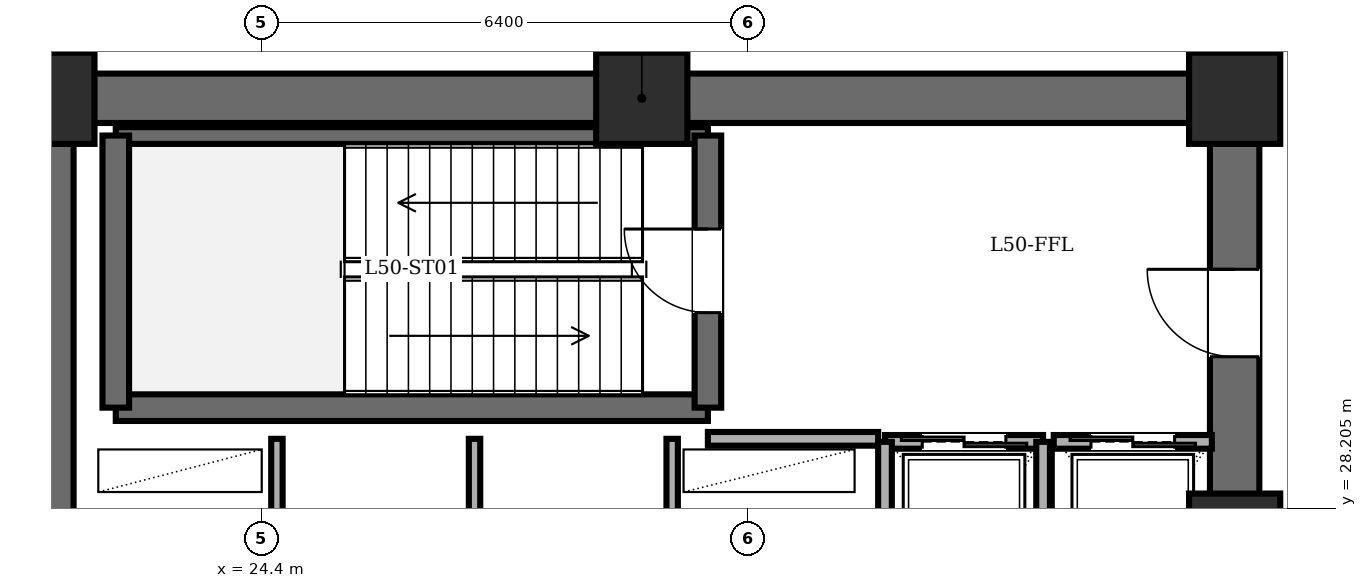
"""IFC4 building model, lengths in metres.
Left out: names, types, materials, properties, quantities, classifications, styles, units other than length and angle.
Written with IfcOpenShell. Run it as: python <this file> out.ifc"""

import sys

from ifc_helpers import new_model, si_unit, direction, frame, frame_2d, origin, origin_2d, place, context, subcontext, project, spatial, rectangle, extrude, element, fill, save


model = new_model("IFC4")
c1 = context("Model", 3, precision=1e-05, world=origin(), true_north=direction((0.0, 1.0)))
c2 = subcontext(c1, "Body", "Model", "MODEL_VIEW")
j1 = project(units=[si_unit("LENGTHUNIT", "METRE"), si_unit("PLANEANGLEUNIT", "RADIAN")], contexts=[c1])
p1 = place(None, origin())
s1 = spatial("IfcSite", under=j1, at=p1, CompositionType="ELEMENT")
p2 = place(p1, origin())
s2 = spatial("IfcBuilding", under=s1, at=p2, CompositionType="ELEMENT")
p3 = place(p2, frame((0.0, 0.0, 190.6)))
s3 = spatial("IfcBuildingStorey", under=s2, at=p3, CompositionType="ELEMENT", Elevation=190.6)
for number, where, z_axis, x_axis in (
    (1, (37.2, 27.8, 0.0), (0.0, 0.0, 1.0), (1.0, 0.0, 0.0)),
    (2, (37.2, 33.6, 0.0), (0.0, 0.0, 1.0), (1.0, 0.0, 0.0)),
    (3, (29.4, 33.6, 0.0), (0.0, 0.0, 1.0), (1.0, 0.0, 0.0)),
    (4, (21.6, 33.6, 0.0), (0.0, 0.0, 1.0), (1.0, 0.0, 0.0)),
):
    element("IfcColumn", number, at=place(p3, frame(where, z_axis=z_axis, x_axis=x_axis)), inside=s3, PredefinedType="COLUMN", context=c2, shape_type="SweptSolid", body=[
        extrude(rectangle(XDim=1.2, YDim=1.2, at=origin_2d()), origin(), (0.0, 0.0, 1.0), 5.6),
    ])
p4 = place(p3, frame((21.6, 14.4, 0.0), z_axis=(0.0, 0.0, 1.0), x_axis=(0.0, 1.0, 0.0)))
e5 = element("IfcWall", 5, at=p4, inside=s3, PredefinedType="SHEAR", context=c2, shape_type="SweptSolid", body=[
    extrude(rectangle(XDim=19.2, YDim=0.65, at=frame_2d((9.6, 0.0))), origin(), (0.0, 0.0, 1.0), 5.36),
])
p5 = place(p3, frame((21.6, 33.6, 0.0), z_axis=(0.0, 0.0, 1.0), x_axis=(1.0, 0.0, 0.0)))
e6 = element("IfcWall", 6, at=p5, inside=s3, PredefinedType="SHEAR", context=c2, shape_type="SweptSolid", body=[
    extrude(rectangle(XDim=15.6, YDim=0.65, at=frame_2d((7.8, 0.0))), origin(), (0.0, 0.0, 1.0), 5.36),
])
p6 = place(p3, frame((37.2, 14.4, 0.0), z_axis=(0.0, 0.0, 1.0), x_axis=(0.0, 1.0, 0.0)))
e7 = element("IfcWall", 7, at=p6, inside=s3, PredefinedType="SHEAR", context=c2, shape_type="SweptSolid", body=[
    extrude(rectangle(XDim=19.2, YDim=0.65, at=frame_2d((9.6, 0.0))), origin(), (0.0, 0.0, 1.0), 5.36),
])
p7 = place(p6, frame((15.8, 0.0, 0.0)))
e8 = element("IfcOpeningElement", 8, at=p7, cuts=e7, PredefinedType="OPENING", context=c2, shape_type="SweptSolid", body=[
    extrude(rectangle(XDim=1.15, YDim=2.15, at=frame_2d((0.575, 1.075))), frame((0.0, 0.335, 0.0), z_axis=(0.0, -1.0, 0.0), x_axis=(1.0, 0.0, 0.0)), (0.0, 0.0, 1.0), 0.67),
])
p8 = place(p6, frame((3.6, 0.0, 0.0)))
e9 = element("IfcOpeningElement", 9, at=p8, cuts=e7, PredefinedType="OPENING", context=c2, shape_type="SweptSolid", body=[
    extrude(rectangle(XDim=1.1, YDim=2.15, at=frame_2d((0.55, 1.075))), frame((0.0, 0.335, 0.0), z_axis=(0.0, -1.0, 0.0), x_axis=(1.0, 0.0, 0.0)), (0.0, 0.0, 1.0), 0.67),
])
p9 = place(p6, frame((8.6, 0.0, 0.0)))
e10 = element("IfcOpeningElement", 10, at=p9, cuts=e7, PredefinedType="OPENING", context=c2, shape_type="SweptSolid", body=[
    extrude(rectangle(XDim=1.3, YDim=2.2, at=frame_2d((0.65, 1.1))), frame((0.0, 0.335, 0.0), z_axis=(0.0, -1.0, 0.0), x_axis=(1.0, 0.0, 0.0)), (0.0, 0.0, 1.0), 0.67),
])
p10 = place(p3, frame((22.48, 29.53, 0.0), z_axis=(0.0, 0.0, 1.0), x_axis=(1.0, 0.0, 0.0)))
e11 = element("IfcWall", 11, at=p10, inside=s3, PredefinedType="SOLIDWALL", context=c2, shape_type="SweptSolid", body=[
    extrude(rectangle(XDim=7.79, YDim=0.35, at=frame_2d((3.895, 0.0))), origin(), (0.0, 0.0, 1.0), 5.36),
])
p11 = place(p3, frame((22.48, 33.11, 0.0), z_axis=(0.0, 0.0, 1.0), x_axis=(1.0, 0.0, 0.0)))
e12 = element("IfcWall", 12, at=p11, inside=s3, PredefinedType="PARTITIONING", context=c2, shape_type="SweptSolid", body=[
    extrude(rectangle(XDim=7.79, YDim=0.22, at=frame_2d((3.895, 0.0))), origin(), (0.0, 0.0, 1.0), 5.36),
])
p12 = place(p3, frame((22.48, 29.53, 0.0), z_axis=(0.0, 0.0, 1.0), x_axis=(0.0, 1.0, 0.0)))
e13 = element("IfcWall", 13, at=p12, inside=s3, PredefinedType="SOLIDWALL", context=c2, shape_type="SweptSolid", body=[
    extrude(rectangle(XDim=3.58, YDim=0.35, at=frame_2d((1.79, 0.0))), origin(), (0.0, 0.0, 1.0), 5.36),
])
p13 = place(p3, frame((30.27, 29.53, 0.0), z_axis=(0.0, 0.0, 1.0), x_axis=(0.0, 1.0, 0.0)))
e14 = element("IfcWall", 14, at=p13, inside=s3, PredefinedType="SOLIDWALL", context=c2, shape_type="SweptSolid", body=[
    extrude(rectangle(XDim=3.58, YDim=0.35, at=frame_2d((1.79, 0.0))), origin(), (0.0, 0.0, 1.0), 5.36),
])
p14 = place(p13, frame((1.25, 0.0, 0.0)))
e15 = element("IfcOpeningElement", 15, at=p14, cuts=e14, PredefinedType="OPENING", context=c2, shape_type="SweptSolid", body=[
    extrude(rectangle(XDim=1.1, YDim=2.15, at=frame_2d((0.55, 1.075))), frame((0.0, 0.185, 0.0), z_axis=(0.0, -1.0, 0.0), x_axis=(1.0, 0.0, 0.0)), (0.0, 0.0, 1.0), 0.37),
])
p15 = place(p3, frame((30.27, 29.12, 0.0), z_axis=(0.0, 0.0, 1.0), x_axis=(1.0, 0.0, 0.0)))
e16 = element("IfcWall", 16, at=p15, inside=s3, PredefinedType="PARTITIONING", context=c2, shape_type="SweptSolid", body=[
    extrude(rectangle(XDim=2.24, YDim=0.18, at=frame_2d((1.12, 0.0))), origin(), (0.0, 0.0, 1.0), 5.36),
])
for number, where, z_axis, x_axis in (
    (17, (24.6, 27.6, 0.0), (0.0, 0.0, 1.0), (0.0, 1.0, 0.0)),
    (18, (27.2, 27.6, 0.0), (0.0, 0.0, 1.0), (0.0, 1.0, 0.0)),
    (19, (29.8, 27.6, 0.0), (0.0, 0.0, 1.0), (0.0, 1.0, 0.0)),
):
    element("IfcWall", number, at=place(p3, frame(where, z_axis=z_axis, x_axis=x_axis)), inside=s3, PredefinedType="PARTITIONING", context=c2, shape_type="SweptSolid", body=[
        extrude(rectangle(XDim=1.52, YDim=0.15, at=frame_2d((0.76, 0.0))), origin(), (0.0, 0.0, 1.0), 5.36),
    ])
p16 = place(p3, frame((32.6, 29.08, 0.0), z_axis=(0.0, 0.0, 1.0), x_axis=(1.0, 0.0, 0.0)))
e20 = element("IfcWall", 20, at=p16, inside=s3, PredefinedType="PARTITIONING", context=c2, shape_type="SweptSolid", body=[
    extrude(rectangle(XDim=2.08, YDim=0.18, at=frame_2d((1.04, 0.0))), origin(), (0.0, 0.0, 1.0), 5.36),
])
p17 = place(p16, frame((0.49, 0.0, 0.0)))
e21 = element("IfcOpeningElement", 21, at=p17, cuts=e20, PredefinedType="OPENING", context=c2, shape_type="SweptSolid", body=[
    extrude(rectangle(XDim=1.1, YDim=2.2, at=frame_2d((0.55, 1.1))), frame((0.0, 0.1, 0.0), z_axis=(0.0, -1.0, 0.0), x_axis=(1.0, 0.0, 0.0)), (0.0, 0.0, 1.0), 0.2),
])
for number, where, z_axis, x_axis in (
    (22, (34.68, 26.35, 0.0), (0.0, 0.0, 1.0), (0.0, 1.0, 0.0)),
    (23, (32.6, 29.08, 0.0), (0.0, 0.0, 1.0), (0.0, -1.0, 0.0)),
):
    element("IfcWall", number, at=place(p3, frame(where, z_axis=z_axis, x_axis=x_axis)), inside=s3, PredefinedType="PARTITIONING", context=c2, shape_type="SweptSolid", body=[
        extrude(rectangle(XDim=2.73, YDim=0.18, at=frame_2d((1.365, 0.0))), origin(), (0.0, 0.0, 1.0), 5.36),
    ])
p18 = place(p3, frame((34.82, 29.08, 0.0), z_axis=(0.0, 0.0, 1.0), x_axis=(1.0, 0.0, 0.0)))
e24 = element("IfcWall", 24, at=p18, inside=s3, PredefinedType="PARTITIONING", context=c2, shape_type="SweptSolid", body=[
    extrude(rectangle(XDim=2.08, YDim=0.18, at=frame_2d((1.04, 0.0))), origin(), (0.0, 0.0, 1.0), 5.36),
])
p19 = place(p18, frame((0.49, 0.0, 0.0)))
e25 = element("IfcOpeningElement", 25, at=p19, cuts=e24, PredefinedType="OPENING", context=c2, shape_type="SweptSolid", body=[
    extrude(rectangle(XDim=1.1, YDim=2.2, at=frame_2d((0.55, 1.1))), frame((0.0, 0.1, 0.0), z_axis=(0.0, -1.0, 0.0), x_axis=(1.0, 0.0, 0.0)), (0.0, 0.0, 1.0), 0.2),
])
p20 = place(p14, origin())
e26 = element("IfcDoor", 26, at=p20, inside=s3, OperationType="SINGLE_SWING_RIGHT", PredefinedType="DOOR", context=c2, shape_type="SweptSolid", body=[
    extrude(rectangle(XDim=1.1, YDim=2.15, at=frame_2d((0.55, 1.075))), frame((0.0, 0.025, 0.0), z_axis=(0.0, -1.0, 0.0), x_axis=(1.0, 0.0, 0.0)), (0.0, 0.0, 1.0), 0.05),
])
fill(e15, e26)
p21 = place(p7, origin())
e27 = element("IfcDoor", 27, at=p21, inside=s3, OperationType="SINGLE_SWING_RIGHT", PredefinedType="DOOR", context=c2, shape_type="SweptSolid", body=[
    extrude(rectangle(XDim=1.15, YDim=2.15, at=frame_2d((0.575, 1.075))), frame((0.0, 0.025, 0.0), z_axis=(0.0, -1.0, 0.0), x_axis=(1.0, 0.0, 0.0)), (0.0, 0.0, 1.0), 0.05),
])
fill(e8, e27)
p22 = place(p17, origin())
e28 = element("IfcDoor", 28, at=p22, inside=s3, OperationType="DOUBLE_DOOR_SLIDING", PredefinedType="DOOR", context=c2, shape_type="SweptSolid", body=[
    extrude(rectangle(XDim=1.1, YDim=2.2, at=frame_2d((0.55, 1.1))), frame((0.0, 0.025, 0.0), z_axis=(0.0, -1.0, 0.0), x_axis=(1.0, 0.0, 0.0)), (0.0, 0.0, 1.0), 0.05),
])
fill(e21, e28)
p23 = place(p19, origin())
e29 = element("IfcDoor", 29, at=p23, inside=s3, OperationType="DOUBLE_DOOR_SLIDING", PredefinedType="DOOR", context=c2, shape_type="SweptSolid", body=[
    extrude(rectangle(XDim=1.1, YDim=2.2, at=frame_2d((0.55, 1.1))), frame((0.0, 0.025, 0.0), z_axis=(0.0, -1.0, 0.0), x_axis=(1.0, 0.0, 0.0)), (0.0, 0.0, 1.0), 0.05),
])
fill(e25, e29)
save(model, sys.argv[1])
